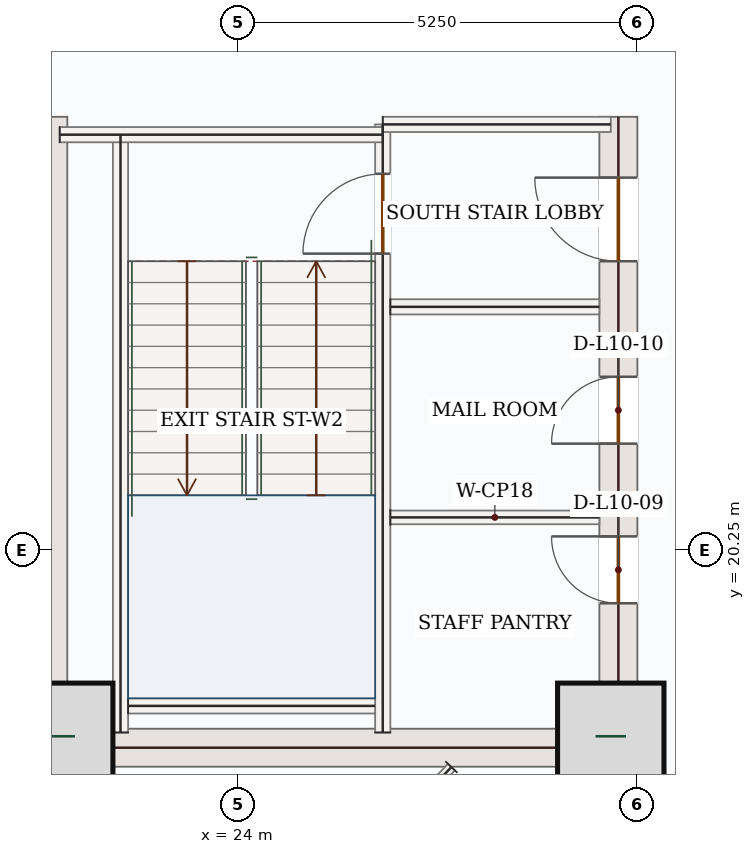
"""IFC4 building model, lengths in metres.
Left out: names, types, materials, properties, quantities, classifications, styles, units other than length and angle.
Written with IfcOpenShell. Run it as: python <this file> out.ifc"""

import sys

from ifc_helpers import new_model, si_unit, direction, frame, frame_2d, origin, origin_2d, place, context, subcontext, project, spatial, rectangle, extrude, source, transform, mapped, element, fill, save


model = new_model("IFC4")
c1 = context("Model", 3, precision=1e-05, world=origin(), true_north=direction((0.0, 1.0)))
c2 = subcontext(c1, "Body", "Model", "MODEL_VIEW")
j1 = project(units=[si_unit("LENGTHUNIT", "METRE"), si_unit("PLANEANGLEUNIT", "RADIAN")], contexts=[c1])
p1 = place(None, origin())
s1 = spatial("IfcSite", under=j1, at=p1, CompositionType="ELEMENT")
p2 = place(p1, origin())
s2 = spatial("IfcBuilding", under=s1, at=p2, CompositionType="ELEMENT")
p3 = place(p2, frame((0.0, 0.0, 50.1)))
s3 = spatial("IfcBuildingStorey", under=s2, at=p3, CompositionType="ELEMENT", Elevation=50.1)
m1 = source(origin(), c2, "Body", "SweptSolid", [
    extrude(rectangle(XDim=8.55, YDim=0.5, at=frame_2d((4.275, 0.0))), origin(), (0.0, 0.0, 1.0), 3.95),
])
p4 = place(p3, frame((21.5, 17.4, 0.0), z_axis=(0.0, 0.0, 1.0), x_axis=(0.0, 1.0, 0.0)))
e1 = element("IfcWall", 1, at=p4, inside=s3, PredefinedType="SHEAR", context=c2, shape_type="MappedRepresentation", body=[
    mapped(m1, transform((0.0, 0.0, 0.0), x_axis=(1.0, 0.0, 0.0), y_axis=(0.0, 1.0, 0.0), z_axis=(0.0, 0.0, 1.0), scale=1.0)),
])
p5 = place(p3, frame((29.0, 17.4, 0.0), z_axis=(0.0, 0.0, 1.0), x_axis=(0.0, 1.0, 0.0)))
e2 = element("IfcWall", 2, at=p5, inside=s3, PredefinedType="SHEAR", context=c2, shape_type="SweptSolid", body=[
    extrude(rectangle(XDim=8.55, YDim=0.5, at=frame_2d((4.275, 0.0))), origin(), (0.0, 0.0, 1.0), 3.95),
])
p6 = place(p5, frame((6.65, 0.0, 0.0)))
e3 = element("IfcOpeningElement", 3, at=p6, cuts=e2, PredefinedType="OPENING", context=c2, shape_type="SweptSolid", body=[
    extrude(rectangle(XDim=1.1, YDim=2.2, at=frame_2d((0.55, 1.1))), frame((0.0, 0.26, 0.0), z_axis=(0.0, -1.0, 0.0), x_axis=(1.0, 0.0, 0.0)), (0.0, 0.0, 1.0), 0.52),
])
p7 = place(p5, frame((2.15, 0.0, 0.0)))
e4 = element("IfcOpeningElement", 4, at=p7, cuts=e2, PredefinedType="OPENING", context=c2, shape_type="SweptSolid", body=[
    extrude(rectangle(XDim=0.88, YDim=2.1, at=frame_2d((0.44, 1.05))), frame((0.0, 0.26, 0.0), z_axis=(0.0, -1.0, 0.0), x_axis=(1.0, 0.0, 0.0)), (0.0, 0.0, 1.0), 0.52),
])
p8 = place(p5, frame((4.25, 0.0, 0.0)))
e5 = element("IfcOpeningElement", 5, at=p8, cuts=e2, PredefinedType="OPENING", context=c2, shape_type="SweptSolid", body=[
    extrude(rectangle(XDim=0.88, YDim=2.1, at=frame_2d((0.44, 1.05))), frame((0.0, 0.26, 0.0), z_axis=(0.0, -1.0, 0.0), x_axis=(1.0, 0.0, 0.0)), (0.0, 0.0, 1.0), 0.52),
])
m2 = source(origin(), c2, "Body", "SweptSolid", [
    extrude(rectangle(XDim=7.0, YDim=0.5, at=frame_2d((3.5, 0.0))), origin(), (0.0, 0.0, 1.0), 3.95),
])
p9 = place(p3, frame((21.75, 17.65, 0.0), z_axis=(0.0, 0.0, 1.0), x_axis=(1.0, 0.0, 0.0)))
e6 = element("IfcWall", 6, at=p9, inside=s3, PredefinedType="SHEAR", context=c2, shape_type="MappedRepresentation", body=[
    mapped(m2, transform((0.0, 0.0, 0.0), x_axis=(1.0, 0.0, 0.0), y_axis=(0.0, 1.0, 0.0), z_axis=(0.0, 0.0, 1.0), scale=1.0)),
])
m3 = source(origin(), c2, "Body", "SweptSolid", [
    extrude(rectangle(XDim=1.4, YDim=1.4, at=origin_2d()), origin(), (0.0, 0.0, 1.0), 4.2),
])
for number, where, z_axis, x_axis in (
    (7, (21.65, 17.8, 0.0), (0.0, 0.0, 1.0), (1.0, 0.0, 0.0)),
    (8, (28.9, 17.8, 0.0), (0.0, 0.0, 1.0), (1.0, 0.0, 0.0)),
):
    element("IfcColumn", number, at=place(p3, frame(where, z_axis=z_axis, x_axis=x_axis)), inside=s3, PredefinedType="COLUMN", context=c2, shape_type="MappedRepresentation", body=[
        mapped(m3, transform((0.0, 0.0, 0.0), x_axis=(1.0, 0.0, 0.0), y_axis=(0.0, 1.0, 0.0), z_axis=(0.0, 0.0, 1.0), scale=1.0)),
    ])
p10 = place(p3, frame((22.658, 14.74, 0.0), z_axis=(0.0, 0.0, 1.0), x_axis=(-0.707106781187, 0.707106781187, 0.0)))
e9 = element("IfcWall", 9, at=p10, inside=s3, PredefinedType="SOLIDWALL", context=c2, shape_type="SweptSolid", body=[
    extrude(rectangle(XDim=5.258, YDim=0.32, at=frame_2d((2.629, 0.0))), origin(), (0.0, 0.0, 1.0), 3.95),
])
p11 = place(p10, frame((1.429, 0.0, 0.85)))
e10 = element("IfcOpeningElement", 10, at=p11, cuts=e9, PredefinedType="OPENING", context=c2, shape_type="SweptSolid", body=[
    extrude(rectangle(XDim=2.4, YDim=1.8, at=frame_2d((1.2, 0.9))), frame((0.0, 0.17, 0.0), z_axis=(0.0, -1.0, 0.0), x_axis=(1.0, 0.0, 0.0)), (0.0, 0.0, 1.0), 0.34),
])
m4 = source(origin(), c2, "Body", "SweptSolid", [
    extrude(rectangle(XDim=7.87, YDim=0.2, at=frame_2d((3.935, 0.0))), origin(), (0.0, 0.0, 1.0), 3.95),
])
p12 = place(p3, frame((22.45, 17.85, 0.0), z_axis=(0.0, 0.0, 1.0), x_axis=(0.0, 1.0, 0.0)))
e11 = element("IfcWall", 11, at=p12, inside=s3, PredefinedType="SOLIDWALL", context=c2, shape_type="MappedRepresentation", body=[
    mapped(m4, transform((0.0, 0.0, 0.0), x_axis=(1.0, 0.0, 0.0), y_axis=(0.0, 1.0, 0.0), z_axis=(0.0, 0.0, 1.0), scale=1.0)),
])
p13 = place(p3, frame((25.9, 17.85, 0.0), z_axis=(0.0, 0.0, 1.0), x_axis=(0.0, 1.0, 0.0)))
e12 = element("IfcWall", 12, at=p13, inside=s3, PredefinedType="SOLIDWALL", context=c2, shape_type="SweptSolid", body=[
    extrude(rectangle(XDim=8.0, YDim=0.2, at=frame_2d((4.0, 0.0))), origin(), (0.0, 0.0, 1.0), 3.95),
])
p14 = place(p13, frame((6.3, 0.0, 0.0)))
e13 = element("IfcOpeningElement", 13, at=p14, cuts=e12, PredefinedType="OPENING", context=c2, shape_type="SweptSolid", body=[
    extrude(rectangle(XDim=1.05, YDim=2.15, at=frame_2d((0.525, 1.075))), frame((0.0, 0.11, 0.0), z_axis=(0.0, -1.0, 0.0), x_axis=(1.0, 0.0, 0.0)), (0.0, 0.0, 1.0), 0.22),
])
m5 = source(origin(), c2, "Body", "SweptSolid", [
    extrude(rectangle(XDim=4.25, YDim=0.2, at=frame_2d((2.125, 0.0))), origin(), (0.0, 0.0, 1.0), 3.95),
])
p15 = place(p3, frame((21.65, 25.715, 0.0), z_axis=(0.0, 0.0, 1.0), x_axis=(1.0, 0.0, 0.0)))
e14 = element("IfcWall", 14, at=p15, inside=s3, PredefinedType="SOLIDWALL", context=c2, shape_type="MappedRepresentation", body=[
    mapped(m5, transform((0.0, 0.0, 0.0), x_axis=(1.0, 0.0, 0.0), y_axis=(0.0, 1.0, 0.0), z_axis=(0.0, 0.0, 1.0), scale=1.0)),
])
m6 = source(origin(), c2, "Body", "SweptSolid", [
    extrude(rectangle(XDim=3.0, YDim=0.2, at=frame_2d((1.5, 0.0))), origin(), (0.0, 0.0, 1.0), 3.95),
])
p16 = place(p3, frame((25.9, 25.85, 0.0), z_axis=(0.0, 0.0, 1.0), x_axis=(1.0, 0.0, 0.0)))
e15 = element("IfcWall", 15, at=p16, inside=s3, PredefinedType="SOLIDWALL", context=c2, shape_type="MappedRepresentation", body=[
    mapped(m6, transform((0.0, 0.0, 0.0), x_axis=(1.0, 0.0, 0.0), y_axis=(0.0, 1.0, 0.0), z_axis=(0.0, 0.0, 1.0), scale=1.0)),
])
m7 = source(origin(), c2, "Body", "SweptSolid", [
    extrude(rectangle(XDim=3.25, YDim=0.2, at=frame_2d((1.625, 0.0))), origin(), (0.0, 0.0, 1.0), 3.95),
])
p17 = place(p3, frame((22.55, 18.2, 0.0), z_axis=(0.0, 0.0, 1.0), x_axis=(1.0, 0.0, 0.0)))
e16 = element("IfcWall", 16, at=p17, inside=s3, PredefinedType="SOLIDWALL", context=c2, shape_type="MappedRepresentation", body=[
    mapped(m7, transform((0.0, 0.0, 0.0), x_axis=(1.0, 0.0, 0.0), y_axis=(0.0, 1.0, 0.0), z_axis=(0.0, 0.0, 1.0), scale=1.0)),
])
m8 = source(origin(), c2, "Body", "SweptSolid", [
    extrude(rectangle(XDim=2.75, YDim=0.2, at=frame_2d((1.375, 0.0))), origin(), (0.0, 0.0, 1.0), 3.95),
])
p18 = place(p3, frame((26.0, 23.45, 0.0), z_axis=(0.0, 0.0, 1.0), x_axis=(1.0, 0.0, 0.0)))
e17 = element("IfcWall", 17, at=p18, inside=s3, PredefinedType="SOLIDWALL", context=c2, shape_type="MappedRepresentation", body=[
    mapped(m8, transform((0.0, 0.0, 0.0), x_axis=(1.0, 0.0, 0.0), y_axis=(0.0, 1.0, 0.0), z_axis=(0.0, 0.0, 1.0), scale=1.0)),
])
m9 = source(origin(), c2, "Body", "SweptSolid", [
    extrude(rectangle(XDim=2.75, YDim=0.18, at=frame_2d((1.375, 0.0))), origin(), (0.0, 0.0, 1.0), 3.95),
])
p19 = place(p3, frame((26.0, 20.68, 0.0), z_axis=(0.0, 0.0, 1.0), x_axis=(1.0, 0.0, 0.0)))
e18 = element("IfcWall", 18, at=p19, inside=s3, PredefinedType="PARTITIONING", context=c2, shape_type="MappedRepresentation", body=[
    mapped(m9, transform((0.0, 0.0, 0.0), x_axis=(1.0, 0.0, 0.0), y_axis=(0.0, 1.0, 0.0), z_axis=(0.0, 0.0, 1.0), scale=1.0)),
])
m10 = source(origin(), c2, "Body", "SweptSolid", [
    extrude(rectangle(XDim=3.438, YDim=0.125, at=frame_2d((1.719, 0.0))), origin(), (0.0, 0.0, 1.0), 3.95),
])
p20 = place(p3, frame((26.803, 17.395, 0.0), z_axis=(0.0, 0.0, 1.0), x_axis=(-0.689493786127, -0.724291597972, 0.0)))
e19 = element("IfcWall", 19, at=p20, inside=s3, PredefinedType="PARTITIONING", context=c2, shape_type="MappedRepresentation", body=[
    mapped(m10, transform((0.0, 0.0, 0.0), x_axis=(1.0, 0.0, 0.0), y_axis=(0.0, 1.0, 0.0), z_axis=(0.0, 0.0, 1.0), scale=1.0)),
])
m11 = source(origin(), c2, "Body", "SweptSolid", [
    extrude(rectangle(XDim=2.4, YDim=1.8, at=frame_2d((1.2, 0.9))), frame((0.0, 0.03, 0.0), z_axis=(0.0, -1.0, 0.0), x_axis=(1.0, 0.0, 0.0)), (0.0, 0.0, 1.0), 0.06),
])
p21 = place(p11, origin())
e20 = element("IfcWindow", 20, at=p21, inside=s3, PartitioningType="DOUBLE_PANEL_VERTICAL", PredefinedType="WINDOW", context=c2, shape_type="MappedRepresentation", body=[
    mapped(m11, transform((0.0, 0.0, 0.0), x_axis=(1.0, 0.0, 0.0), y_axis=(0.0, 1.0, 0.0), z_axis=(0.0, 0.0, 1.0), scale=1.0)),
])
fill(e10, e20)
m12 = source(origin(), c2, "Body", "SweptSolid", [
    extrude(rectangle(XDim=1.05, YDim=2.15, at=frame_2d((0.525, 1.075))), frame((0.0, 0.025, 0.0), z_axis=(0.0, -1.0, 0.0), x_axis=(1.0, 0.0, 0.0)), (0.0, 0.0, 1.0), 0.05),
])
p22 = place(p14, origin())
e21 = element("IfcDoor", 21, at=p22, inside=s3, OperationType="SINGLE_SWING_LEFT", PredefinedType="DOOR", context=c2, shape_type="MappedRepresentation", body=[
    mapped(m12, transform((0.0, 0.0, 0.0), x_axis=(1.0, 0.0, 0.0), y_axis=(0.0, 1.0, 0.0), z_axis=(0.0, 0.0, 1.0), scale=1.0)),
])
fill(e13, e21)
m13 = source(origin(), c2, "Body", "SweptSolid", [
    extrude(rectangle(XDim=1.1, YDim=2.2, at=frame_2d((0.55, 1.1))), frame((0.0, 0.025, 0.0), z_axis=(0.0, -1.0, 0.0), x_axis=(1.0, 0.0, 0.0)), (0.0, 0.0, 1.0), 0.05),
])
p23 = place(p6, origin())
e22 = element("IfcDoor", 22, at=p23, inside=s3, OperationType="SINGLE_SWING_RIGHT", PredefinedType="DOOR", context=c2, shape_type="MappedRepresentation", body=[
    mapped(m13, transform((0.0, 0.0, 0.0), x_axis=(1.0, 0.0, 0.0), y_axis=(0.0, 1.0, 0.0), z_axis=(0.0, 0.0, 1.0), scale=1.0)),
])
fill(e3, e22)
m14 = source(origin(), c2, "Body", "SweptSolid", [
    extrude(rectangle(XDim=0.88, YDim=2.1, at=frame_2d((0.44, 1.05))), frame((0.0, 0.025, 0.0), z_axis=(0.0, -1.0, 0.0), x_axis=(1.0, 0.0, 0.0)), (0.0, 0.0, 1.0), 0.05),
])
p24 = place(p7, origin())
e23 = element("IfcDoor", 23, at=p24, inside=s3, OperationType="SINGLE_SWING_RIGHT", PredefinedType="DOOR", context=c2, shape_type="MappedRepresentation", body=[
    mapped(m14, transform((0.0, 0.0, 0.0), x_axis=(1.0, 0.0, 0.0), y_axis=(0.0, 1.0, 0.0), z_axis=(0.0, 0.0, 1.0), scale=1.0)),
])
fill(e4, e23)
p25 = place(p8, origin())
e24 = element("IfcDoor", 24, at=p25, inside=s3, OperationType="SINGLE_SWING_LEFT", PredefinedType="DOOR", context=c2, shape_type="MappedRepresentation", body=[
    mapped(m14, transform((0.0, 0.0, 0.0), x_axis=(1.0, 0.0, 0.0), y_axis=(0.0, 1.0, 0.0), z_axis=(0.0, 0.0, 1.0), scale=1.0)),
])
fill(e5, e24)
save(model, sys.argv[1])
